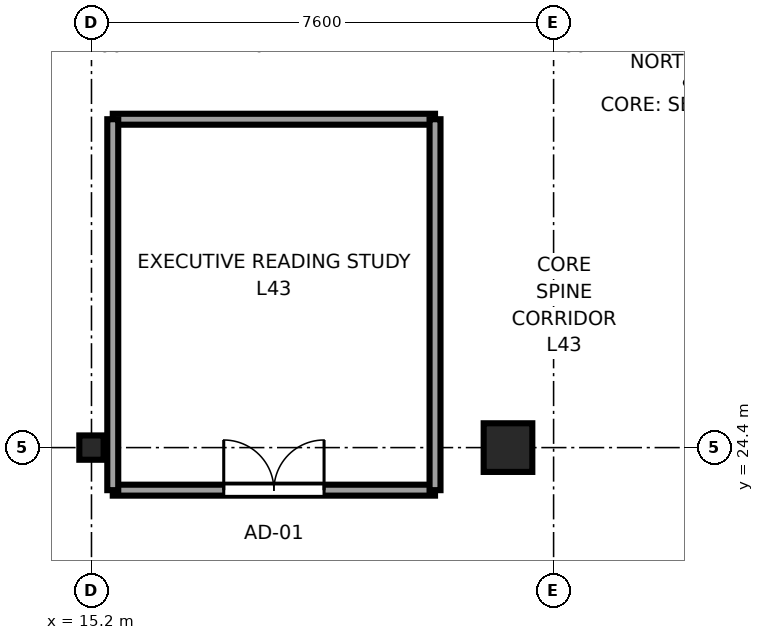
"""IFC4 building model, lengths in metres.
Left out: names, types, materials, properties, quantities, classifications, styles, units other than length and angle.
Written with IfcOpenShell. Run it as: python <this file> out.ifc"""

import sys

from ifc_helpers import new_model, si_unit, direction, frame, frame_2d, origin, origin_2d, place, context, subcontext, project, spatial, rectangle, i_section, extrude, source, transform, mapped, element, fill, save


model = new_model("IFC4")
c1 = context("Model", 3, precision=1e-05, world=origin(), true_north=direction((0.0, 1.0)))
c2 = subcontext(c1, "Body", "Model", "MODEL_VIEW")
j1 = project(units=[si_unit("LENGTHUNIT", "METRE"), si_unit("PLANEANGLEUNIT", "RADIAN")], contexts=[c1])
p1 = place(None, origin())
s1 = spatial("IfcSite", under=j1, at=p1, CompositionType="ELEMENT")
p2 = place(p1, origin())
s2 = spatial("IfcBuilding", under=s1, at=p2, CompositionType="ELEMENT")
p3 = place(p2, frame((0.0, 0.0, 164.8)))
s3 = spatial("IfcBuildingStorey", under=s2, at=p3, CompositionType="ELEMENT", Elevation=164.8)
m1 = source(origin(), c2, "Body", "SweptSolid", [
    extrude(i_section(OverallWidth=0.4, OverallDepth=0.4, WebThickness=0.02, FlangeThickness=0.035, at=origin_2d()), origin(), (0.0, 0.0, 1.0), 3.55),
])
p4 = place(p3, frame((15.2, 24.4, 0.0), z_axis=(0.0, 0.0, 1.0), x_axis=(1.0, 0.0, 0.0)))
e1 = element("IfcColumn", 1, at=p4, inside=s3, PredefinedType="COLUMN", context=c2, shape_type="MappedRepresentation", body=[
    mapped(m1, transform((0.0, 0.0, 0.0), x_axis=(1.0, 0.0, 0.0), y_axis=(0.0, 1.0, 0.0), z_axis=(0.0, 0.0, 1.0), scale=1.0)),
])
m2 = source(origin(), c2, "Body", "SweptSolid", [
    extrude(rectangle(XDim=0.8, YDim=0.8, at=origin_2d()), origin(), (0.0, 0.0, 1.0), 3.55),
])
p5 = place(p3, frame((22.05, 24.4, 0.0), z_axis=(0.0, 0.0, 1.0), x_axis=(1.0, 0.0, 0.0)))
e2 = element("IfcColumn", 2, at=p5, inside=s3, PredefinedType="COLUMN", context=c2, shape_type="MappedRepresentation", body=[
    mapped(m2, transform((0.0, 0.0, 0.0), x_axis=(1.0, 0.0, 0.0), y_axis=(0.0, 1.0, 0.0), z_axis=(0.0, 0.0, 1.0), scale=1.0)),
])
p6 = place(p3, frame((15.55, 23.7, 0.0), z_axis=(0.0, 0.0, 1.0), x_axis=(1.0, 0.0, 0.0)))
e3 = element("IfcWall", 3, at=p6, inside=s3, PredefinedType="PARTITIONING", context=c2, shape_type="SweptSolid", body=[
    extrude(rectangle(XDim=5.3, YDim=0.18, at=frame_2d((2.65, 0.0))), origin(), (0.0, 0.0, 1.0), 3.37),
])
p7 = place(p6, frame((1.825, 0.0, 0.0)))
e4 = element("IfcOpeningElement", 4, at=p7, cuts=e3, PredefinedType="OPENING", context=c2, shape_type="SweptSolid", body=[
    extrude(rectangle(XDim=1.65, YDim=2.15, at=frame_2d((0.825, 1.075))), frame((0.0, 0.1, 0.0), z_axis=(0.0, -1.0, 0.0), x_axis=(1.0, 0.0, 0.0)), (0.0, 0.0, 1.0), 0.2),
])
p8 = place(p3, frame((15.55, 29.8, 0.0), z_axis=(0.0, 0.0, 1.0), x_axis=(1.0, 0.0, 0.0)))
e5 = element("IfcWall", 5, at=p8, inside=s3, PredefinedType="PARTITIONING", context=c2, shape_type="SweptSolid", body=[
    extrude(rectangle(XDim=5.3, YDim=0.18, at=frame_2d((2.65, 0.0))), origin(), (0.0, 0.0, 1.0), 3.37),
])
for number, where, z_axis, x_axis in (
    (6, (15.55, 23.7, 0.0), (0.0, 0.0, 1.0), (0.0, 1.0, 0.0)),
    (7, (20.85, 23.7, 0.0), (0.0, 0.0, 1.0), (0.0, 1.0, 0.0)),
):
    element("IfcWall", number, at=place(p3, frame(where, z_axis=z_axis, x_axis=x_axis)), inside=s3, PredefinedType="PARTITIONING", context=c2, shape_type="SweptSolid", body=[
        extrude(rectangle(XDim=6.1, YDim=0.18, at=frame_2d((3.05, 0.0))), origin(), (0.0, 0.0, 1.0), 3.37),
    ])
m3 = source(origin(), c2, "Body", "SweptSolid", [
    extrude(rectangle(XDim=1.65, YDim=2.15, at=frame_2d((0.825, 1.075))), frame((0.0, 0.025, 0.0), z_axis=(0.0, -1.0, 0.0), x_axis=(1.0, 0.0, 0.0)), (0.0, 0.0, 1.0), 0.05),
])
p9 = place(p7, origin())
e8 = element("IfcDoor", 8, at=p9, inside=s3, OperationType="DOUBLE_DOOR_SINGLE_SWING", PredefinedType="DOOR", context=c2, shape_type="MappedRepresentation", body=[
    mapped(m3, transform((0.0, 0.0, 0.0), x_axis=(1.0, 0.0, 0.0), y_axis=(0.0, 1.0, 0.0), z_axis=(0.0, 0.0, 1.0), scale=1.0)),
])
fill(e4, e8)
save(model, sys.argv[1])
